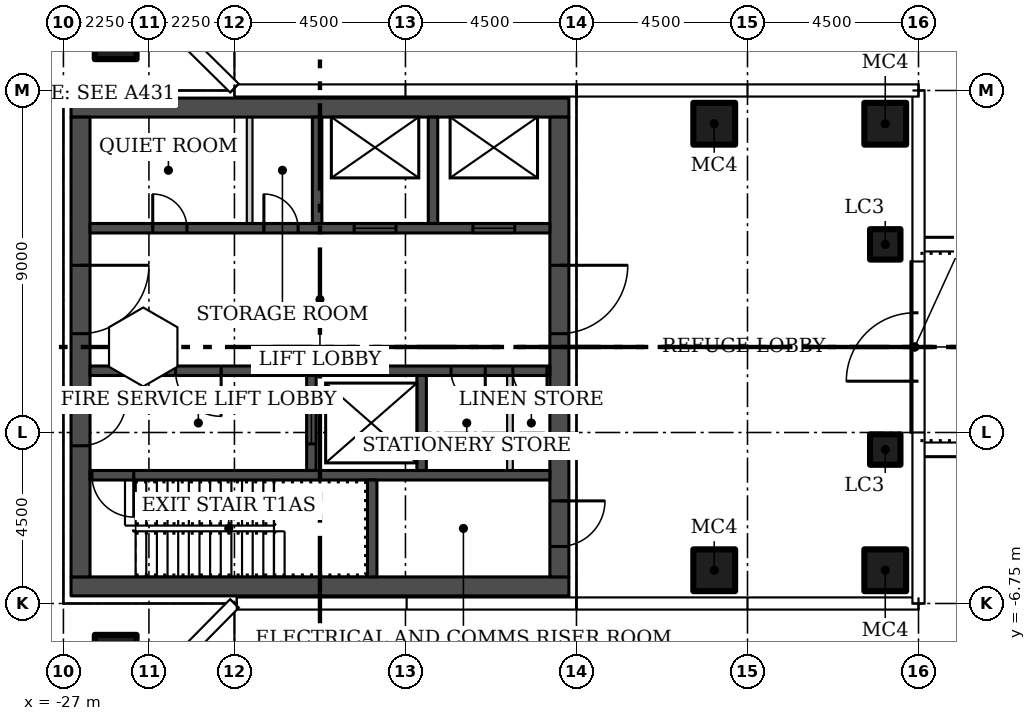
"""IFC4 building model, lengths in metres.
Left out: names, types, materials, properties, quantities, classifications, styles, units other than length and angle.
Written with IfcOpenShell. Run it as: python <this file> out.ifc"""

import sys

from ifc_helpers import new_model, si_unit, direction, frame, frame_2d, origin, origin_2d, place, context, subcontext, project, spatial, rectangle, hollow_rectangle, extrude, element, fill, save


model = new_model("IFC4")
c1 = context("Model", 3, precision=1e-05, world=origin(), true_north=direction((0.0, 1.0)))
c2 = subcontext(c1, "Body", "Model", "MODEL_VIEW")
j1 = project(units=[si_unit("LENGTHUNIT", "METRE"), si_unit("PLANEANGLEUNIT", "RADIAN")], contexts=[c1])
p1 = place(None, origin())
s1 = spatial("IfcSite", under=j1, at=p1, CompositionType="ELEMENT")
p2 = place(p1, origin())
s2 = spatial("IfcBuilding", under=s1, at=p2, CompositionType="ELEMENT")
p3 = place(p2, frame((0.0, 0.0, 177.9)))
s3 = spatial("IfcBuildingStorey", under=s2, at=p3, CompositionType="ELEMENT", Elevation=177.9)
for number, where in (
    (1, (-25.625, 8.125, 0.0)),
    (2, (-25.625, -8.125, 0.0)),
    (3, (-9.875, -5.875, 0.0)),
    (4, (-5.375, -5.875, 0.0)),
    (5, (-9.875, 5.875, 0.0)),
    (6, (-5.375, 5.875, 0.0)),
):
    element("IfcColumn", number, at=place(p3, frame(where)), inside=s3, PredefinedType="COLUMN", context=c2, shape_type="SweptSolid", body=[
        extrude(hollow_rectangle(XDim=1.1, YDim=1.1, WallThickness=0.04, at=origin_2d()), origin(), (0.0, 0.0, 1.0), 4.45),
    ])
for number, where in (
    (7, (-5.375, -2.7, 0.0)),
    (8, (-5.375, 2.7, 0.0)),
):
    element("IfcColumn", number, at=place(p3, frame(where)), inside=s3, PredefinedType="COLUMN", context=c2, shape_type="SweptSolid", body=[
        extrude(hollow_rectangle(XDim=0.8, YDim=0.8, WallThickness=0.03, at=origin_2d()), origin(), (0.0, 0.0, 1.0), 4.45),
    ])
p4 = place(p3, frame((-26.8, 6.75, 0.0), z_axis=(0.0, 0.0, 1.0), x_axis=(-1.0, 0.0, 0.0)))
e9 = element("IfcWall", 9, at=p4, inside=s3, PredefinedType="PARTITIONING", context=c2, shape_type="SweptSolid", body=[
    extrude(rectangle(XDim=13.9, YDim=0.2, at=frame_2d((6.95, 0.0))), origin(), (0.0, 0.0, 1.0), 4.45),
])
p5 = place(p4, frame((6.2, 0.0, 0.0)))
e10 = element("IfcOpeningElement", 10, at=p5, cuts=e9, PredefinedType="OPENING", context=c2, shape_type="SweptSolid", body=[
    extrude(rectangle(XDim=1.5, YDim=2.4, at=frame_2d((0.75, 1.2))), frame((0.0, 0.11, 0.0), z_axis=(0.0, -1.0, 0.0), x_axis=(1.0, 0.0, 0.0)), (0.0, 0.0, 1.0), 0.22),
])
p6 = place(p3, frame((-4.6, -2.25, 0.0), z_axis=(0.0, 0.0, 1.0), x_axis=(0.0, 1.0, 0.0)))
e11 = element("IfcWall", 11, at=p6, inside=s3, PredefinedType="PARTITIONING", context=c2, shape_type="SweptSolid", body=[
    extrude(rectangle(XDim=4.5, YDim=0.2, at=frame_2d((2.25, 0.0))), origin(), (0.0, 0.0, 1.0), 4.45),
])
p7 = place(p6, frame((1.35, 0.0, 0.0)))
e12 = element("IfcOpeningElement", 12, at=p7, cuts=e11, PredefinedType="OPENING", context=c2, shape_type="SweptSolid", body=[
    extrude(rectangle(XDim=1.8, YDim=2.1, at=frame_2d((0.9, 1.05))), frame((0.0, 0.11, 0.0), z_axis=(0.0, -1.0, 0.0), x_axis=(1.0, 0.0, 0.0)), (0.0, 0.0, 1.0), 0.22),
])
for number, where in (
    (13, (-26.8, -6.3, 0.0)),
    (14, (-26.8, 6.3, 0.0)),
):
    element("IfcWall", number, at=place(p3, frame(where)), inside=s3, PredefinedType="SHEAR", context=c2, shape_type="SweptSolid", body=[
        extrude(rectangle(XDim=13.1, YDim=0.5, at=frame_2d((6.55, 0.0))), origin(), (0.0, 0.0, 1.0), 4.45),
    ])
p8 = place(p3, frame((-26.55, 6.05, 0.0), z_axis=(0.0, 0.0, 1.0), x_axis=(0.0, -1.0, 0.0)))
e15 = element("IfcWall", 15, at=p8, inside=s3, PredefinedType="SHEAR", context=c2, shape_type="SweptSolid", body=[
    extrude(rectangle(XDim=12.1, YDim=0.5, at=frame_2d((6.05, 0.0))), origin(), (0.0, 0.0, 1.0), 4.45),
])
p9 = place(p8, frame((7.45, 0.0, 0.0)))
e16 = element("IfcOpeningElement", 16, at=p9, cuts=e15, PredefinedType="OPENING", context=c2, shape_type="SweptSolid", body=[
    extrude(rectangle(XDim=1.2, YDim=2.1, at=frame_2d((0.6, 1.05))), frame((0.0, 0.26, 0.0), z_axis=(0.0, -1.0, 0.0), x_axis=(1.0, 0.0, 0.0)), (0.0, 0.0, 1.0), 0.52),
])
p10 = place(p8, frame((3.9, 0.0, 0.0)))
e17 = element("IfcOpeningElement", 17, at=p10, cuts=e15, PredefinedType="OPENING", context=c2, shape_type="SweptSolid", body=[
    extrude(rectangle(XDim=1.8, YDim=2.4, at=frame_2d((0.9, 1.2))), frame((0.0, 0.26, 0.0), z_axis=(0.0, -1.0, 0.0), x_axis=(1.0, 0.0, 0.0)), (0.0, 0.0, 1.0), 0.52),
])
p11 = place(p3, frame((-13.95, 6.05, 0.0), z_axis=(0.0, 0.0, 1.0), x_axis=(0.0, -1.0, 0.0)))
e18 = element("IfcWall", 18, at=p11, inside=s3, PredefinedType="SHEAR", context=c2, shape_type="SweptSolid", body=[
    extrude(rectangle(XDim=12.1, YDim=0.5, at=frame_2d((6.05, 0.0))), origin(), (0.0, 0.0, 1.0), 4.45),
])
p12 = place(p11, frame((10.1, 0.0, 0.0)))
e19 = element("IfcOpeningElement", 19, at=p12, cuts=e18, PredefinedType="OPENING", context=c2, shape_type="SweptSolid", body=[
    extrude(rectangle(XDim=1.2, YDim=2.1, at=frame_2d((0.6, 1.05))), frame((0.0, 0.26, 0.0), z_axis=(0.0, -1.0, 0.0), x_axis=(1.0, 0.0, 0.0)), (0.0, 0.0, 1.0), 0.52),
])
p13 = place(p11, frame((3.9, 0.0, 0.0)))
e20 = element("IfcOpeningElement", 20, at=p13, cuts=e18, PredefinedType="OPENING", context=c2, shape_type="SweptSolid", body=[
    extrude(rectangle(XDim=1.8, YDim=2.4, at=frame_2d((0.9, 1.2))), frame((0.0, 0.26, 0.0), z_axis=(0.0, -1.0, 0.0), x_axis=(1.0, 0.0, 0.0)), (0.0, 0.0, 1.0), 0.52),
])
p14 = place(p3, frame((-14.2, -3.375, 0.0), z_axis=(0.0, 0.0, 1.0), x_axis=(-1.0, 0.0, 0.0)))
e21 = element("IfcWall", 21, at=p14, inside=s3, PredefinedType="SHEAR", context=c2, shape_type="SweptSolid", body=[
    extrude(rectangle(XDim=12.1, YDim=0.25, at=frame_2d((6.05, 0.0))), origin(), (0.0, 0.0, 1.0), 4.45),
])
p15 = place(p14, frame((10.95, 0.0, 0.0)))
e22 = element("IfcOpeningElement", 22, at=p15, cuts=e21, PredefinedType="OPENING", context=c2, shape_type="SweptSolid", body=[
    extrude(rectangle(XDim=1.1, YDim=2.1, at=frame_2d((0.55, 1.05))), frame((0.0, 0.135, 0.0), z_axis=(0.0, -1.0, 0.0), x_axis=(1.0, 0.0, 0.0)), (0.0, 0.0, 1.0), 0.27),
])
p16 = place(p3, frame((-18.875, -6.05, 0.0), z_axis=(0.0, 0.0, 1.0), x_axis=(0.0, 1.0, 0.0)))
e23 = element("IfcWall", 23, at=p16, inside=s3, PredefinedType="SHEAR", context=c2, shape_type="SweptSolid", body=[
    extrude(rectangle(XDim=2.55, YDim=0.25, at=frame_2d((1.275, 0.0))), origin(), (0.0, 0.0, 1.0), 4.45),
])
p17 = place(p3, frame((-14.2, -0.625, 0.0), z_axis=(0.0, 0.0, 1.0), x_axis=(-1.0, 0.0, 0.0)))
e24 = element("IfcWall", 24, at=p17, inside=s3, PredefinedType="SHEAR", context=c2, shape_type="SweptSolid", body=[
    extrude(rectangle(XDim=12.1, YDim=0.25, at=frame_2d((6.05, 0.0))), origin(), (0.0, 0.0, 1.0), 4.45),
])
p18 = place(p17, frame((8.65, 0.0, 0.0)))
e25 = element("IfcOpeningElement", 25, at=p18, cuts=e24, PredefinedType="OPENING", context=c2, shape_type="SweptSolid", body=[
    extrude(rectangle(XDim=1.2, YDim=2.1, at=frame_2d((0.6, 1.05))), frame((0.0, 0.135, 0.0), z_axis=(0.0, -1.0, 0.0), x_axis=(1.0, 0.0, 0.0)), (0.0, 0.0, 1.0), 0.27),
])
p19 = place(p17, frame((1.7, 0.0, 0.0)))
e26 = element("IfcOpeningElement", 26, at=p19, cuts=e24, PredefinedType="OPENING", context=c2, shape_type="SweptSolid", body=[
    extrude(rectangle(XDim=0.9, YDim=2.1, at=frame_2d((0.45, 1.05))), frame((0.0, 0.135, 0.0), z_axis=(0.0, -1.0, 0.0), x_axis=(1.0, 0.0, 0.0)), (0.0, 0.0, 1.0), 0.27),
])
p20 = place(p17, frame((0.075, 0.0, 0.0)))
e27 = element("IfcOpeningElement", 27, at=p20, cuts=e24, PredefinedType="OPENING", context=c2, shape_type="SweptSolid", body=[
    extrude(rectangle(XDim=0.9, YDim=2.1, at=frame_2d((0.45, 1.05))), frame((0.0, 0.135, 0.0), z_axis=(0.0, -1.0, 0.0), x_axis=(1.0, 0.0, 0.0)), (0.0, 0.0, 1.0), 0.27),
])
p21 = place(p3, frame((-20.475, -3.25, 0.0), z_axis=(0.0, 0.0, 1.0), x_axis=(0.0, 1.0, 0.0)))
e28 = element("IfcWall", 28, at=p21, inside=s3, PredefinedType="SHEAR", context=c2, shape_type="SweptSolid", body=[
    extrude(rectangle(XDim=2.5, YDim=0.25, at=frame_2d((1.25, 0.0))), origin(), (0.0, 0.0, 1.0), 4.45),
])
p22 = place(p21, frame((0.7, 0.0, 0.0)))
e29 = element("IfcOpeningElement", 29, at=p22, cuts=e28, PredefinedType="OPENING", context=c2, shape_type="SweptSolid", body=[
    extrude(rectangle(XDim=1.1, YDim=2.1, at=frame_2d((0.55, 1.05))), frame((0.0, 0.135, 0.0), z_axis=(0.0, -1.0, 0.0), x_axis=(1.0, 0.0, 0.0)), (0.0, 0.0, 1.0), 0.27),
])
p23 = place(p3, frame((-17.575, -3.25, 0.0), z_axis=(0.0, 0.0, 1.0), x_axis=(0.0, 1.0, 0.0)))
e30 = element("IfcWall", 30, at=p23, inside=s3, PredefinedType="SHEAR", context=c2, shape_type="SweptSolid", body=[
    extrude(rectangle(XDim=2.5, YDim=0.25, at=frame_2d((1.25, 0.0))), origin(), (0.0, 0.0, 1.0), 4.45),
])
p24 = place(p3, frame((-15.25, -3.25, 0.0), z_axis=(0.0, 0.0, 1.0), x_axis=(0.0, 1.0, 0.0)))
e31 = element("IfcWall", 31, at=p24, inside=s3, PredefinedType="PARTITIONING", context=c2, shape_type="SweptSolid", body=[
    extrude(rectangle(XDim=2.5, YDim=0.15, at=frame_2d((1.25, 0.0))), origin(), (0.0, 0.0, 1.0), 4.45),
])
p25 = place(p3, frame((-26.3, 3.125, 0.0)))
e32 = element("IfcWall", 32, at=p25, inside=s3, PredefinedType="SHEAR", context=c2, shape_type="SweptSolid", body=[
    extrude(rectangle(XDim=12.1, YDim=0.25, at=frame_2d((6.05, 0.0))), origin(), (0.0, 0.0, 1.0), 4.45),
])
p26 = place(p25, frame((6.95, 0.0, 0.0)))
e33 = element("IfcOpeningElement", 33, at=p26, cuts=e32, PredefinedType="OPENING", context=c2, shape_type="SweptSolid", body=[
    extrude(rectangle(XDim=1.1, YDim=2.1, at=frame_2d((0.55, 1.05))), frame((0.0, 0.135, 0.0), z_axis=(0.0, -1.0, 0.0), x_axis=(1.0, 0.0, 0.0)), (0.0, 0.0, 1.0), 0.27),
])
p27 = place(p25, frame((10.075, 0.0, 0.0)))
e34 = element("IfcOpeningElement", 34, at=p27, cuts=e32, PredefinedType="OPENING", context=c2, shape_type="SweptSolid", body=[
    extrude(rectangle(XDim=1.1, YDim=2.1, at=frame_2d((0.55, 1.05))), frame((0.0, 0.135, 0.0), z_axis=(0.0, -1.0, 0.0), x_axis=(1.0, 0.0, 0.0)), (0.0, 0.0, 1.0), 0.27),
])
p28 = place(p25, frame((1.65, 0.0, 0.0)))
e35 = element("IfcOpeningElement", 35, at=p28, cuts=e32, PredefinedType="OPENING", context=c2, shape_type="SweptSolid", body=[
    extrude(rectangle(XDim=0.9, YDim=2.1, at=frame_2d((0.45, 1.05))), frame((0.0, 0.135, 0.0), z_axis=(0.0, -1.0, 0.0), x_axis=(1.0, 0.0, 0.0)), (0.0, 0.0, 1.0), 0.27),
])
p29 = place(p25, frame((4.575, 0.0, 0.0)))
e36 = element("IfcOpeningElement", 36, at=p29, cuts=e32, PredefinedType="OPENING", context=c2, shape_type="SweptSolid", body=[
    extrude(rectangle(XDim=0.9, YDim=2.1, at=frame_2d((0.45, 1.05))), frame((0.0, 0.135, 0.0), z_axis=(0.0, -1.0, 0.0), x_axis=(1.0, 0.0, 0.0)), (0.0, 0.0, 1.0), 0.27),
])
for number, where, z_axis, x_axis in (
    (37, (-20.325, 3.25, 0.0), (0.0, 0.0, 1.0), (0.0, 1.0, 0.0)),
    (38, (-17.275, 3.25, 0.0), (0.0, 0.0, 1.0), (0.0, 1.0, 0.0)),
):
    element("IfcWall", number, at=place(p3, frame(where, z_axis=z_axis, x_axis=x_axis)), inside=s3, PredefinedType="SHEAR", context=c2, shape_type="SweptSolid", body=[
        extrude(rectangle(XDim=2.8, YDim=0.25, at=frame_2d((1.4, 0.0))), origin(), (0.0, 0.0, 1.0), 4.45),
    ])
p30 = place(p3, frame((-22.1, 3.25, 0.0), z_axis=(0.0, 0.0, 1.0), x_axis=(0.0, 1.0, 0.0)))
e39 = element("IfcWall", 39, at=p30, inside=s3, PredefinedType="PARTITIONING", context=c2, shape_type="SweptSolid", body=[
    extrude(rectangle(XDim=2.8, YDim=0.15, at=frame_2d((1.4, 0.0))), origin(), (0.0, 0.0, 1.0), 4.45),
])
p31 = place(p7, origin())
e40 = element("IfcDoor", 40, at=p31, inside=s3, OperationType="DOUBLE_DOOR_SINGLE_SWING", PredefinedType="DOOR", context=c2, shape_type="SweptSolid", body=[
    extrude(rectangle(XDim=1.8, YDim=2.1, at=frame_2d((0.9, 1.05))), frame((0.0, 0.025, 0.0), z_axis=(0.0, -1.0, 0.0), x_axis=(1.0, 0.0, 0.0)), (0.0, 0.0, 1.0), 0.05),
])
fill(e12, e40)
p32 = place(p9, origin())
e41 = element("IfcDoor", 41, at=p32, inside=s3, OperationType="SINGLE_SWING_RIGHT", PredefinedType="DOOR", context=c2, shape_type="SweptSolid", body=[
    extrude(rectangle(XDim=1.2, YDim=2.1, at=frame_2d((0.6, 1.05))), frame((0.0, 0.025, 0.0), z_axis=(0.0, -1.0, 0.0), x_axis=(1.0, 0.0, 0.0)), (0.0, 0.0, 1.0), 0.05),
])
fill(e16, e41)
p33 = place(p10, origin())
e42 = element("IfcDoor", 42, at=p33, inside=s3, OperationType="DOUBLE_DOOR_SINGLE_SWING", PredefinedType="DOOR", context=c2, shape_type="SweptSolid", body=[
    extrude(rectangle(XDim=1.8, YDim=2.4, at=frame_2d((0.9, 1.2))), frame((0.0, 0.025, 0.0), z_axis=(0.0, -1.0, 0.0), x_axis=(1.0, 0.0, 0.0)), (0.0, 0.0, 1.0), 0.05),
])
fill(e17, e42)
p34 = place(p12, origin())
e43 = element("IfcDoor", 43, at=p34, inside=s3, OperationType="SINGLE_SWING_RIGHT", PredefinedType="DOOR", context=c2, shape_type="SweptSolid", body=[
    extrude(rectangle(XDim=1.2, YDim=2.1, at=frame_2d((0.6, 1.05))), frame((0.0, 0.025, 0.0), z_axis=(0.0, -1.0, 0.0), x_axis=(1.0, 0.0, 0.0)), (0.0, 0.0, 1.0), 0.05),
])
fill(e19, e43)
p35 = place(p13, origin())
e44 = element("IfcDoor", 44, at=p35, inside=s3, OperationType="DOUBLE_DOOR_SINGLE_SWING", PredefinedType="DOOR", context=c2, shape_type="SweptSolid", body=[
    extrude(rectangle(XDim=1.8, YDim=2.4, at=frame_2d((0.9, 1.2))), frame((0.0, 0.025, 0.0), z_axis=(0.0, -1.0, 0.0), x_axis=(1.0, 0.0, 0.0)), (0.0, 0.0, 1.0), 0.05),
])
fill(e20, e44)
p36 = place(p15, origin())
e45 = element("IfcDoor", 45, at=p36, inside=s3, OperationType="SINGLE_SWING_RIGHT", PredefinedType="DOOR", context=c2, shape_type="SweptSolid", body=[
    extrude(rectangle(XDim=1.1, YDim=2.1, at=frame_2d((0.55, 1.05))), frame((0.0, 0.025, 0.0), z_axis=(0.0, -1.0, 0.0), x_axis=(1.0, 0.0, 0.0)), (0.0, 0.0, 1.0), 0.05),
])
fill(e22, e45)
p37 = place(p18, origin())
e46 = element("IfcDoor", 46, at=p37, inside=s3, OperationType="SINGLE_SWING_RIGHT", PredefinedType="DOOR", context=c2, shape_type="SweptSolid", body=[
    extrude(rectangle(XDim=1.2, YDim=2.1, at=frame_2d((0.6, 1.05))), frame((0.0, 0.025, 0.0), z_axis=(0.0, -1.0, 0.0), x_axis=(1.0, 0.0, 0.0)), (0.0, 0.0, 1.0), 0.05),
])
fill(e25, e46)
p38 = place(p19, origin())
e47 = element("IfcDoor", 47, at=p38, inside=s3, OperationType="SINGLE_SWING_LEFT", PredefinedType="DOOR", context=c2, shape_type="SweptSolid", body=[
    extrude(rectangle(XDim=0.9, YDim=2.1, at=frame_2d((0.45, 1.05))), frame((0.0, 0.025, 0.0), z_axis=(0.0, -1.0, 0.0), x_axis=(1.0, 0.0, 0.0)), (0.0, 0.0, 1.0), 0.05),
])
fill(e26, e47)
p39 = place(p20, origin())
e48 = element("IfcDoor", 48, at=p39, inside=s3, OperationType="SINGLE_SWING_LEFT", PredefinedType="DOOR", context=c2, shape_type="SweptSolid", body=[
    extrude(rectangle(XDim=0.9, YDim=2.1, at=frame_2d((0.45, 1.05))), frame((0.0, 0.025, 0.0), z_axis=(0.0, -1.0, 0.0), x_axis=(1.0, 0.0, 0.0)), (0.0, 0.0, 1.0), 0.05),
])
fill(e27, e48)
p40 = place(p22, origin())
e49 = element("IfcDoor", 49, at=p40, inside=s3, OperationType="SLIDING_TO_LEFT", PredefinedType="DOOR", context=c2, shape_type="SweptSolid", body=[
    extrude(rectangle(XDim=1.1, YDim=2.1, at=frame_2d((0.55, 1.05))), frame((0.0, 0.025, 0.0), z_axis=(0.0, -1.0, 0.0), x_axis=(1.0, 0.0, 0.0)), (0.0, 0.0, 1.0), 0.05),
])
fill(e29, e49)
p41 = place(p26, origin())
e50 = element("IfcDoor", 50, at=p41, inside=s3, OperationType="SLIDING_TO_LEFT", PredefinedType="DOOR", context=c2, shape_type="SweptSolid", body=[
    extrude(rectangle(XDim=1.1, YDim=2.1, at=frame_2d((0.55, 1.05))), frame((0.0, 0.025, 0.0), z_axis=(0.0, -1.0, 0.0), x_axis=(1.0, 0.0, 0.0)), (0.0, 0.0, 1.0), 0.05),
])
fill(e33, e50)
p42 = place(p27, origin())
e51 = element("IfcDoor", 51, at=p42, inside=s3, OperationType="SLIDING_TO_LEFT", PredefinedType="DOOR", context=c2, shape_type="SweptSolid", body=[
    extrude(rectangle(XDim=1.1, YDim=2.1, at=frame_2d((0.55, 1.05))), frame((0.0, 0.025, 0.0), z_axis=(0.0, -1.0, 0.0), x_axis=(1.0, 0.0, 0.0)), (0.0, 0.0, 1.0), 0.05),
])
fill(e34, e51)
p43 = place(p28, origin())
e52 = element("IfcDoor", 52, at=p43, inside=s3, OperationType="SINGLE_SWING_LEFT", PredefinedType="DOOR", context=c2, shape_type="SweptSolid", body=[
    extrude(rectangle(XDim=0.9, YDim=2.1, at=frame_2d((0.45, 1.05))), frame((0.0, 0.025, 0.0), z_axis=(0.0, -1.0, 0.0), x_axis=(1.0, 0.0, 0.0)), (0.0, 0.0, 1.0), 0.05),
])
fill(e35, e52)
p44 = place(p29, origin())
e53 = element("IfcDoor", 53, at=p44, inside=s3, OperationType="SINGLE_SWING_LEFT", PredefinedType="DOOR", context=c2, shape_type="SweptSolid", body=[
    extrude(rectangle(XDim=0.9, YDim=2.1, at=frame_2d((0.45, 1.05))), frame((0.0, 0.025, 0.0), z_axis=(0.0, -1.0, 0.0), x_axis=(1.0, 0.0, 0.0)), (0.0, 0.0, 1.0), 0.05),
])
fill(e36, e53)
save(model, sys.argv[1])
